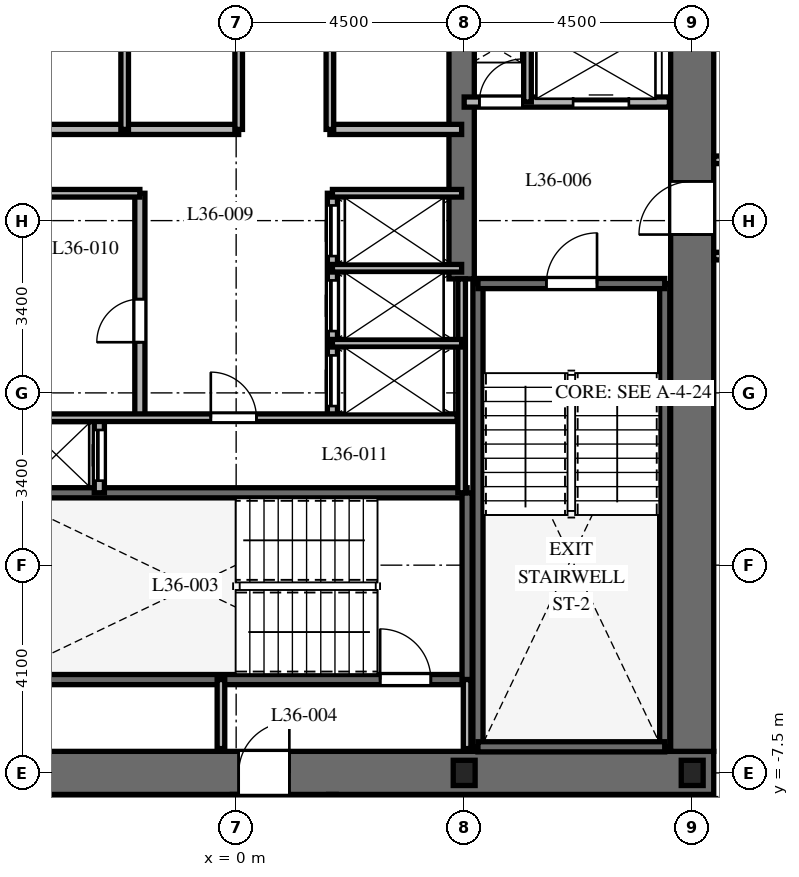
"""IFC4 building model, lengths in metres.
Left out: names, types, materials, properties, quantities, classifications, styles, units other than length and angle.
Written with IfcOpenShell. Run it as: python <this file> out.ifc"""

import sys

from ifc_helpers import new_model, si_unit, direction, frame, frame_2d, origin, origin_2d, place, context, subcontext, project, spatial, rectangle, i_section, extrude, element, fill, save


model = new_model("IFC4")
c1 = context("Model", 3, precision=1e-05, world=origin(), true_north=direction((0.0, 1.0)))
c2 = subcontext(c1, "Body", "Model", "MODEL_VIEW")
j1 = project(units=[si_unit("LENGTHUNIT", "METRE"), si_unit("PLANEANGLEUNIT", "RADIAN")], contexts=[c1])
p1 = place(None, origin())
s1 = spatial("IfcSite", under=j1, at=p1, CompositionType="ELEMENT")
p2 = place(p1, origin())
s2 = spatial("IfcBuilding", under=s1, at=p2, CompositionType="ELEMENT")
p3 = place(p2, frame((0.0, 0.0, 148.0)))
s3 = spatial("IfcBuildingStorey", under=s2, at=p3, CompositionType="ELEMENT", Elevation=148.0)
p4 = place(p3, frame((-9.425, -7.5, 0.0), z_axis=(0.0, 0.0, 1.0), x_axis=(1.0, 0.0, 0.0)))
e1 = element("IfcWall", 1, at=p4, inside=s3, PredefinedType="SHEAR", context=c2, shape_type="SweptSolid", body=[
    extrude(rectangle(XDim=18.85, YDim=0.85, at=frame_2d((9.425, 0.0))), origin(), (0.0, 0.0, 1.0), 3.7),
])
p5 = place(p4, frame((9.475, 0.0, 0.0)))
e2 = element("IfcOpeningElement", 2, at=p5, cuts=e1, PredefinedType="OPENING", context=c2, shape_type="SweptSolid", body=[
    extrude(rectangle(XDim=1.0, YDim=2.15, at=frame_2d((0.5, 1.075))), frame((0.0, 0.435, 0.0), z_axis=(0.0, -1.0, 0.0), x_axis=(1.0, 0.0, 0.0)), (0.0, 0.0, 1.0), 0.87),
])
p6 = place(p3, frame((9.0, -7.075, 0.0), z_axis=(0.0, 0.0, 1.0), x_axis=(0.0, 1.0, 0.0)))
e3 = element("IfcWall", 3, at=p6, inside=s3, PredefinedType="SHEAR", context=c2, shape_type="SweptSolid", body=[
    extrude(rectangle(XDim=14.15, YDim=0.85, at=frame_2d((7.075, 0.0))), origin(), (0.0, 0.0, 1.0), 3.7),
])
p7 = place(p6, frame((10.2, 0.0, 0.0)))
e4 = element("IfcOpeningElement", 4, at=p7, cuts=e3, PredefinedType="OPENING", context=c2, shape_type="SweptSolid", body=[
    extrude(rectangle(XDim=1.05, YDim=2.15, at=frame_2d((0.525, 1.075))), frame((0.0, 0.435, 0.0), z_axis=(0.0, -1.0, 0.0), x_axis=(1.0, 0.0, 0.0)), (0.0, 0.0, 1.0), 0.87),
])
p8 = place(p3, frame((4.45, 2.25, 0.0), z_axis=(0.0, 0.0, 1.0), x_axis=(0.0, 1.0, 0.0)))
e5 = element("IfcWall", 5, at=p8, inside=s3, PredefinedType="SHEAR", context=c2, shape_type="SweptSolid", body=[
    extrude(rectangle(XDim=4.825, YDim=0.5, at=frame_2d((2.413, 0.0))), origin(), (0.0, 0.0, 1.0), 3.7),
])
for number, where, z_axis, x_axis in (
    (6, (4.772, -6.985, 0.0), (0.0, 0.0, 1.0), (0.0, 1.0, 0.0)),
    (7, (8.458, -6.985, 0.0), (0.0, 0.0, 1.0), (0.0, 1.0, 0.0)),
):
    element("IfcWall", number, at=place(p3, frame(where, z_axis=z_axis, x_axis=x_axis)), inside=s3, PredefinedType="SHEAR", context=c2, shape_type="SweptSolid", body=[
        extrude(rectangle(XDim=9.143, YDim=0.2, at=frame_2d((4.572, 0.0))), origin(), (0.0, 0.0, 1.0), 3.7),
    ])
p9 = place(p3, frame((4.772, -6.985, 0.0), z_axis=(0.0, 0.0, 1.0), x_axis=(1.0, 0.0, 0.0)))
e8 = element("IfcWall", 8, at=p9, inside=s3, PredefinedType="SHEAR", context=c2, shape_type="SweptSolid", body=[
    extrude(rectangle(XDim=3.686, YDim=0.2, at=frame_2d((1.843, 0.0))), origin(), (0.0, 0.0, 1.0), 3.7),
])
p10 = place(p3, frame((4.772, 2.158, 0.0), z_axis=(0.0, 0.0, 1.0), x_axis=(1.0, 0.0, 0.0)))
e9 = element("IfcWall", 9, at=p10, inside=s3, PredefinedType="SHEAR", context=c2, shape_type="SweptSolid", body=[
    extrude(rectangle(XDim=3.686, YDim=0.2, at=frame_2d((1.843, 0.0))), origin(), (0.0, 0.0, 1.0), 3.7),
])
p11 = place(p10, frame((1.35, 0.0, 0.0)))
e10 = element("IfcOpeningElement", 10, at=p11, cuts=e9, PredefinedType="OPENING", context=c2, shape_type="SweptSolid", body=[
    extrude(rectangle(XDim=1.0, YDim=2.15, at=frame_2d((0.5, 1.075))), frame((0.0, 0.11, 0.0), z_axis=(0.0, -1.0, 0.0), x_axis=(1.0, 0.0, 0.0)), (0.0, 0.0, 1.0), 0.22),
])
p12 = place(p3, frame((-4.608, -5.658, 0.0), z_axis=(0.0, 0.0, 1.0), x_axis=(1.0, 0.0, 0.0)))
e11 = element("IfcWall", 11, at=p12, inside=s3, PredefinedType="SHEAR", context=c2, shape_type="SweptSolid", body=[
    extrude(rectangle(XDim=9.166, YDim=0.2, at=frame_2d((4.583, 0.0))), origin(), (0.0, 0.0, 1.0), 3.7),
])
p13 = place(p12, frame((7.45, 0.0, 0.0)))
e12 = element("IfcOpeningElement", 12, at=p13, cuts=e11, PredefinedType="OPENING", context=c2, shape_type="SweptSolid", body=[
    extrude(rectangle(XDim=1.0, YDim=2.15, at=frame_2d((0.5, 1.075))), frame((0.0, 0.11, 0.0), z_axis=(0.0, -1.0, 0.0), x_axis=(1.0, 0.0, 0.0)), (0.0, 0.0, 1.0), 0.22),
])
p14 = place(p3, frame((-4.608, -1.972, 0.0), z_axis=(0.0, 0.0, 1.0), x_axis=(1.0, 0.0, 0.0)))
e13 = element("IfcWall", 13, at=p14, inside=s3, PredefinedType="SHEAR", context=c2, shape_type="SweptSolid", body=[
    extrude(rectangle(XDim=9.166, YDim=0.2, at=frame_2d((4.583, 0.0))), origin(), (0.0, 0.0, 1.0), 3.7),
])
p15 = place(p3, frame((4.558, -5.658, 0.0), z_axis=(0.0, 0.0, 1.0), x_axis=(0.0, 1.0, 0.0)))
e14 = element("IfcWall", 14, at=p15, inside=s3, PredefinedType="SHEAR", context=c2, shape_type="SweptSolid", body=[
    extrude(rectangle(XDim=3.686, YDim=0.2, at=frame_2d((1.843, 0.0))), origin(), (0.0, 0.0, 1.0), 3.7),
])
for number, where, z_axis, x_axis in (
    (15, (4.5, -7.5, 0.0), (0.0, 0.0, 1.0), (1.0, 0.0, 0.0)),
    (16, (9.0, -7.5, 0.0), (0.0, 0.0, 1.0), (1.0, 0.0, 0.0)),
):
    element("IfcColumn", number, at=place(p3, frame(where, z_axis=z_axis, x_axis=x_axis)), inside=s3, PredefinedType="COLUMN", context=c2, shape_type="SweptSolid", body=[
        extrude(i_section(OverallWidth=0.432, OverallDepth=0.498, WebThickness=0.056, FlangeThickness=0.089, at=origin_2d()), origin(), (0.0, 0.0, 1.0), 3.7),
    ])
for number, where, z_axis, x_axis in (
    (17, (-0.3, -7.02, 0.0), (0.0, 0.0, 1.0), (0.0, 1.0, 0.0)),
    (18, (4.558, -7.02, 0.0), (0.0, 0.0, 1.0), (0.0, 1.0, 0.0)),
):
    element("IfcWall", number, at=place(p3, frame(where, z_axis=z_axis, x_axis=x_axis)), inside=s3, PredefinedType="PARTITIONING", context=c2, shape_type="SweptSolid", body=[
        extrude(rectangle(XDim=1.362, YDim=0.15, at=frame_2d((0.681, 0.0))), origin(), (0.0, 0.0, 1.0), 3.4),
    ])
p16 = place(p3, frame((4.5, 5.74, 0.0), z_axis=(0.0, 0.0, 1.0), x_axis=(1.0, 0.0, 0.0)))
e19 = element("IfcWall", 19, at=p16, inside=s3, PredefinedType="PARTITIONING", context=c2, shape_type="SweptSolid", body=[
    extrude(rectangle(XDim=4.05, YDim=0.2, at=frame_2d((2.025, 0.0))), origin(), (0.0, 0.0, 1.0), 3.4),
])
p17 = place(p16, frame((0.3, 0.0, 0.0)))
e20 = element("IfcOpeningElement", 20, at=p17, cuts=e19, PredefinedType="OPENING", context=c2, shape_type="SweptSolid", body=[
    extrude(rectangle(XDim=0.85, YDim=2.03, at=frame_2d((0.425, 1.015))), frame((0.0, 0.11, 0.0), z_axis=(0.0, -1.0, 0.0), x_axis=(1.0, 0.0, 0.0)), (0.0, 0.0, 1.0), 0.22),
])
p18 = place(p16, frame((2.15, 0.0, 0.0)))
e21 = element("IfcOpeningElement", 21, at=p18, cuts=e19, PredefinedType="OPENING", context=c2, shape_type="SweptSolid", body=[
    extrude(rectangle(XDim=1.1, YDim=2.2, at=frame_2d((0.55, 1.1))), frame((0.0, 0.11, 0.0), z_axis=(0.0, -1.0, 0.0), x_axis=(1.0, 0.0, 0.0)), (0.0, 0.0, 1.0), 0.22),
])
p19 = place(p3, frame((5.75, 5.74, 0.0), z_axis=(0.0, 0.0, 1.0), x_axis=(0.0, 1.0, 0.0)))
e22 = element("IfcWall", 22, at=p19, inside=s3, PredefinedType="PARTITIONING", context=c2, shape_type="SweptSolid", body=[
    extrude(rectangle(XDim=1.41, YDim=0.15, at=frame_2d((0.705, 0.0))), origin(), (0.0, 0.0, 1.0), 3.4),
])
p20 = place(p3, frame((-2.7, -1.972, 0.0), z_axis=(0.0, 0.0, 1.0), x_axis=(0.0, 1.0, 0.0)))
e23 = element("IfcWall", 23, at=p20, inside=s3, PredefinedType="PARTITIONING", context=c2, shape_type="SweptSolid", body=[
    extrude(rectangle(XDim=1.472, YDim=0.2, at=frame_2d((0.736, 0.0))), origin(), (0.0, 0.0, 1.0), 3.4),
])
p21 = place(p20, frame((0.24, 0.0, 0.0)))
e24 = element("IfcOpeningElement", 24, at=p21, cuts=e23, PredefinedType="OPENING", context=c2, shape_type="SweptSolid", body=[
    extrude(rectangle(XDim=1.0, YDim=2.2, at=frame_2d((0.5, 1.1))), frame((0.0, 0.11, 0.0), z_axis=(0.0, -1.0, 0.0), x_axis=(1.0, 0.0, 0.0)), (0.0, 0.0, 1.0), 0.22),
])
p22 = place(p3, frame((-4.45, 5.2, 0.0), z_axis=(0.0, 0.0, 1.0), x_axis=(1.0, 0.0, 0.0)))
e25 = element("IfcWall", 25, at=p22, inside=s3, PredefinedType="PARTITIONING", context=c2, shape_type="SweptSolid", body=[
    extrude(rectangle(XDim=4.5, YDim=0.2, at=frame_2d((2.25, 0.0))), origin(), (0.0, 0.0, 1.0), 3.4),
])
p23 = place(p3, frame((1.85, 5.2, 0.0), z_axis=(0.0, 0.0, 1.0), x_axis=(1.0, 0.0, 0.0)))
e26 = element("IfcWall", 26, at=p23, inside=s3, PredefinedType="PARTITIONING", context=c2, shape_type="SweptSolid", body=[
    extrude(rectangle(XDim=2.6, YDim=0.2, at=frame_2d((1.3, 0.0))), origin(), (0.0, 0.0, 1.0), 3.4),
])
p24 = place(p3, frame((-2.2, 5.2, 0.0), z_axis=(0.0, 0.0, 1.0), x_axis=(0.0, 1.0, 0.0)))
e27 = element("IfcWall", 27, at=p24, inside=s3, PredefinedType="PARTITIONING", context=c2, shape_type="SweptSolid", body=[
    extrude(rectangle(XDim=1.85, YDim=0.15, at=frame_2d((0.925, 0.0))), origin(), (0.0, 0.0, 1.0), 3.4),
])
for number, where, z_axis, x_axis in (
    (28, (0.05, 5.2, 0.0), (0.0, 0.0, 1.0), (0.0, 1.0, 0.0)),
    (29, (1.85, 5.2, 0.0), (0.0, 0.0, 1.0), (0.0, 1.0, 0.0)),
):
    element("IfcWall", number, at=place(p3, frame(where, z_axis=z_axis, x_axis=x_axis)), inside=s3, PredefinedType="PARTITIONING", context=c2, shape_type="SweptSolid", body=[
        extrude(rectangle(XDim=1.95, YDim=0.15, at=frame_2d((0.975, 0.0))), origin(), (0.0, 0.0, 1.0), 3.4),
    ])
p25 = place(p3, frame((4.45, -1.972, 0.0), z_axis=(0.0, 0.0, 1.0), x_axis=(0.0, 1.0, 0.0)))
e30 = element("IfcWall", 30, at=p25, inside=s3, PredefinedType="PARTITIONING", context=c2, shape_type="SweptSolid", body=[
    extrude(rectangle(XDim=4.222, YDim=0.15, at=frame_2d((2.111, 0.0))), origin(), (0.0, 0.0, 1.0), 3.4),
])
p26 = place(p3, frame((-1.9, -0.5, 0.0), z_axis=(0.0, 0.0, 1.0), x_axis=(0.0, 1.0, 0.0)))
e31 = element("IfcWall", 31, at=p26, inside=s3, PredefinedType="PARTITIONING", context=c2, shape_type="SweptSolid", body=[
    extrude(rectangle(XDim=4.44, YDim=0.2, at=frame_2d((2.22, 0.0))), origin(), (0.0, 0.0, 1.0), 3.4),
])
p27 = place(p26, frame((1.5, 0.0, 0.0)))
e32 = element("IfcOpeningElement", 32, at=p27, cuts=e31, PredefinedType="OPENING", context=c2, shape_type="SweptSolid", body=[
    extrude(rectangle(XDim=0.85, YDim=2.03, at=frame_2d((0.425, 1.015))), frame((0.0, 0.11, 0.0), z_axis=(0.0, -1.0, 0.0), x_axis=(1.0, 0.0, 0.0)), (0.0, 0.0, 1.0), 0.22),
])
p28 = place(p3, frame((-4.45, 3.94, 0.0), z_axis=(0.0, 0.0, 1.0), x_axis=(1.0, 0.0, 0.0)))
e33 = element("IfcWall", 33, at=p28, inside=s3, PredefinedType="PARTITIONING", context=c2, shape_type="SweptSolid", body=[
    extrude(rectangle(XDim=2.55, YDim=0.15, at=frame_2d((1.275, 0.0))), origin(), (0.0, 0.0, 1.0), 3.4),
])
p29 = place(p3, frame((1.9, -0.5, 0.0), z_axis=(0.0, 0.0, 1.0), x_axis=(0.0, 1.0, 0.0)))
e34 = element("IfcWall", 34, at=p29, inside=s3, PredefinedType="PARTITIONING", context=c2, shape_type="SweptSolid", body=[
    extrude(rectangle(XDim=4.44, YDim=0.2, at=frame_2d((2.22, 0.0))), origin(), (0.0, 0.0, 1.0), 3.4),
])
p30 = place(p29, frame((0.24, 0.0, 0.0)))
e35 = element("IfcOpeningElement", 35, at=p30, cuts=e34, PredefinedType="OPENING", context=c2, shape_type="SweptSolid", body=[
    extrude(rectangle(XDim=1.0, YDim=2.2, at=frame_2d((0.5, 1.1))), frame((0.0, 0.11, 0.0), z_axis=(0.0, -1.0, 0.0), x_axis=(1.0, 0.0, 0.0)), (0.0, 0.0, 1.0), 0.22),
])
p31 = place(p29, frame((1.72, 0.0, 0.0)))
e36 = element("IfcOpeningElement", 36, at=p31, cuts=e34, PredefinedType="OPENING", context=c2, shape_type="SweptSolid", body=[
    extrude(rectangle(XDim=1.0, YDim=2.2, at=frame_2d((0.5, 1.1))), frame((0.0, 0.11, 0.0), z_axis=(0.0, -1.0, 0.0), x_axis=(1.0, 0.0, 0.0)), (0.0, 0.0, 1.0), 0.22),
])
p32 = place(p29, frame((3.2, 0.0, 0.0)))
e37 = element("IfcOpeningElement", 37, at=p32, cuts=e34, PredefinedType="OPENING", context=c2, shape_type="SweptSolid", body=[
    extrude(rectangle(XDim=1.0, YDim=2.2, at=frame_2d((0.5, 1.1))), frame((0.0, 0.11, 0.0), z_axis=(0.0, -1.0, 0.0), x_axis=(1.0, 0.0, 0.0)), (0.0, 0.0, 1.0), 0.22),
])
for number, where, z_axis, x_axis in (
    (38, (1.9, 3.94, 0.0), (0.0, 0.0, 1.0), (1.0, 0.0, 0.0)),
    (39, (1.9, 0.98, 0.0), (0.0, 0.0, 1.0), (1.0, 0.0, 0.0)),
    (40, (1.9, 2.46, 0.0), (0.0, 0.0, 1.0), (1.0, 0.0, 0.0)),
):
    element("IfcWall", number, at=place(p3, frame(where, z_axis=z_axis, x_axis=x_axis)), inside=s3, PredefinedType="PARTITIONING", context=c2, shape_type="SweptSolid", body=[
        extrude(rectangle(XDim=2.55, YDim=0.15, at=frame_2d((1.275, 0.0))), origin(), (0.0, 0.0, 1.0), 3.4),
    ])
p33 = place(p3, frame((-4.36, -0.49, 0.0), z_axis=(0.0, 0.0, 1.0), x_axis=(1.0, 0.0, 0.0)))
e41 = element("IfcWall", 41, at=p33, inside=s3, PredefinedType="PARTITIONING", context=c2, shape_type="SweptSolid", body=[
    extrude(rectangle(XDim=8.72, YDim=0.15, at=frame_2d((4.36, 0.0))), origin(), (0.0, 0.0, 1.0), 3.4),
])
p34 = place(p33, frame((3.86, 0.0, 0.0)))
e42 = element("IfcOpeningElement", 42, at=p34, cuts=e41, PredefinedType="OPENING", context=c2, shape_type="SweptSolid", body=[
    extrude(rectangle(XDim=0.9, YDim=2.03, at=frame_2d((0.45, 1.015))), frame((0.0, 0.085, 0.0), z_axis=(0.0, -1.0, 0.0), x_axis=(1.0, 0.0, 0.0)), (0.0, 0.0, 1.0), 0.17),
])
p35 = place(p3, frame((11.55, 2.7, 0.0), z_axis=(0.0, 0.0, 1.0), x_axis=(-1.0, 0.0, 0.0)))
e43 = element("IfcWall", 43, at=p35, inside=s3, PredefinedType="PARTITIONING", context=c2, shape_type="SweptSolid", body=[
    extrude(rectangle(XDim=2.125, YDim=0.15, at=frame_2d((1.062, 0.0))), origin(), (0.0, 0.0, 1.0), 3.4),
])
p36 = place(p3, frame((9.425, 4.6, 0.0), z_axis=(0.0, 0.0, 1.0), x_axis=(1.0, 0.0, 0.0)))
e44 = element("IfcWall", 44, at=p36, inside=s3, PredefinedType="PARTITIONING", context=c2, shape_type="SweptSolid", body=[
    extrude(rectangle(XDim=2.125, YDim=0.15, at=frame_2d((1.062, 0.0))), origin(), (0.0, 0.0, 1.0), 3.4),
])
p37 = place(p36, frame((0.637, 0.0, 0.0)))
e45 = element("IfcOpeningElement", 45, at=p37, cuts=e44, PredefinedType="OPENING", context=c2, shape_type="SweptSolid", body=[
    extrude(rectangle(XDim=0.85, YDim=2.03, at=frame_2d((0.425, 1.015))), frame((0.0, 0.085, 0.0), z_axis=(0.0, -1.0, 0.0), x_axis=(1.0, 0.0, 0.0)), (0.0, 0.0, 1.0), 0.17),
])
for number, where, z_axis, x_axis in (
    (46, (0.0, -10.05, 0.0), (0.0, 0.0, 1.0), (0.0, 1.0, 0.0)),
    (47, (1.9, -7.925, 0.0), (0.0, 0.0, 1.0), (0.0, -1.0, 0.0)),
):
    element("IfcWall", number, at=place(p3, frame(where, z_axis=z_axis, x_axis=x_axis)), inside=s3, PredefinedType="PARTITIONING", context=c2, shape_type="SweptSolid", body=[
        extrude(rectangle(XDim=2.125, YDim=0.15, at=frame_2d((1.062, 0.0))), origin(), (0.0, 0.0, 1.0), 3.4),
    ])
p38 = place(p11, origin())
e48 = element("IfcDoor", 48, at=p38, inside=s3, OperationType="SINGLE_SWING_RIGHT", PredefinedType="DOOR", context=c2, shape_type="SweptSolid", body=[
    extrude(rectangle(XDim=1.0, YDim=2.15, at=frame_2d((0.5, 1.075))), frame((0.0, 0.025, 0.0), z_axis=(0.0, -1.0, 0.0), x_axis=(1.0, 0.0, 0.0)), (0.0, 0.0, 1.0), 0.05),
])
fill(e10, e48)
p39 = place(p13, origin())
e49 = element("IfcDoor", 49, at=p39, inside=s3, OperationType="SINGLE_SWING_LEFT", PredefinedType="DOOR", context=c2, shape_type="SweptSolid", body=[
    extrude(rectangle(XDim=1.0, YDim=2.15, at=frame_2d((0.5, 1.075))), frame((0.0, 0.025, 0.0), z_axis=(0.0, -1.0, 0.0), x_axis=(1.0, 0.0, 0.0)), (0.0, 0.0, 1.0), 0.05),
])
fill(e12, e49)
p40 = place(p5, origin())
e50 = element("IfcDoor", 50, at=p40, inside=s3, OperationType="SINGLE_SWING_RIGHT", PredefinedType="DOOR", context=c2, shape_type="SweptSolid", body=[
    extrude(rectangle(XDim=1.0, YDim=2.15, at=frame_2d((0.5, 1.075))), frame((0.0, 0.025, 0.0), z_axis=(0.0, -1.0, 0.0), x_axis=(1.0, 0.0, 0.0)), (0.0, 0.0, 1.0), 0.05),
])
fill(e2, e50)
p41 = place(p7, origin())
e51 = element("IfcDoor", 51, at=p41, inside=s3, OperationType="SINGLE_SWING_LEFT", PredefinedType="DOOR", context=c2, shape_type="SweptSolid", body=[
    extrude(rectangle(XDim=1.05, YDim=2.15, at=frame_2d((0.525, 1.075))), frame((0.0, 0.025, 0.0), z_axis=(0.0, -1.0, 0.0), x_axis=(1.0, 0.0, 0.0)), (0.0, 0.0, 1.0), 0.05),
])
fill(e4, e51)
p42 = place(p17, origin())
e52 = element("IfcDoor", 52, at=p42, inside=s3, OperationType="SINGLE_SWING_RIGHT", PredefinedType="DOOR", context=c2, shape_type="SweptSolid", body=[
    extrude(rectangle(XDim=0.85, YDim=2.03, at=frame_2d((0.425, 1.015))), frame((0.0, 0.025, 0.0), z_axis=(0.0, -1.0, 0.0), x_axis=(1.0, 0.0, 0.0)), (0.0, 0.0, 1.0), 0.05),
])
fill(e20, e52)
p43 = place(p18, origin())
e53 = element("IfcDoor", 53, at=p43, inside=s3, OperationType="SLIDING_TO_RIGHT", PredefinedType="DOOR", context=c2, shape_type="SweptSolid", body=[
    extrude(rectangle(XDim=1.1, YDim=2.2, at=frame_2d((0.55, 1.1))), frame((0.0, 0.025, 0.0), z_axis=(0.0, -1.0, 0.0), x_axis=(1.0, 0.0, 0.0)), (0.0, 0.0, 1.0), 0.05),
])
fill(e21, e53)
p44 = place(p21, origin())
e54 = element("IfcDoor", 54, at=p44, inside=s3, OperationType="SLIDING_TO_LEFT", PredefinedType="DOOR", context=c2, shape_type="SweptSolid", body=[
    extrude(rectangle(XDim=1.0, YDim=2.2, at=frame_2d((0.5, 1.1))), frame((0.0, 0.025, 0.0), z_axis=(0.0, -1.0, 0.0), x_axis=(1.0, 0.0, 0.0)), (0.0, 0.0, 1.0), 0.05),
])
fill(e24, e54)
p45 = place(p27, origin())
e55 = element("IfcDoor", 55, at=p45, inside=s3, OperationType="SINGLE_SWING_LEFT", PredefinedType="DOOR", context=c2, shape_type="SweptSolid", body=[
    extrude(rectangle(XDim=0.85, YDim=2.03, at=frame_2d((0.425, 1.015))), frame((0.0, 0.025, 0.0), z_axis=(0.0, -1.0, 0.0), x_axis=(1.0, 0.0, 0.0)), (0.0, 0.0, 1.0), 0.05),
])
fill(e32, e55)
p46 = place(p30, origin())
e56 = element("IfcDoor", 56, at=p46, inside=s3, OperationType="SLIDING_TO_RIGHT", PredefinedType="DOOR", context=c2, shape_type="SweptSolid", body=[
    extrude(rectangle(XDim=1.0, YDim=2.2, at=frame_2d((0.5, 1.1))), frame((0.0, 0.025, 0.0), z_axis=(0.0, -1.0, 0.0), x_axis=(1.0, 0.0, 0.0)), (0.0, 0.0, 1.0), 0.05),
])
fill(e35, e56)
p47 = place(p31, origin())
e57 = element("IfcDoor", 57, at=p47, inside=s3, OperationType="SLIDING_TO_RIGHT", PredefinedType="DOOR", context=c2, shape_type="SweptSolid", body=[
    extrude(rectangle(XDim=1.0, YDim=2.2, at=frame_2d((0.5, 1.1))), frame((0.0, 0.025, 0.0), z_axis=(0.0, -1.0, 0.0), x_axis=(1.0, 0.0, 0.0)), (0.0, 0.0, 1.0), 0.05),
])
fill(e36, e57)
p48 = place(p32, origin())
e58 = element("IfcDoor", 58, at=p48, inside=s3, OperationType="SLIDING_TO_RIGHT", PredefinedType="DOOR", context=c2, shape_type="SweptSolid", body=[
    extrude(rectangle(XDim=1.0, YDim=2.2, at=frame_2d((0.5, 1.1))), frame((0.0, 0.025, 0.0), z_axis=(0.0, -1.0, 0.0), x_axis=(1.0, 0.0, 0.0)), (0.0, 0.0, 1.0), 0.05),
])
fill(e37, e58)
p49 = place(p34, origin())
e59 = element("IfcDoor", 59, at=p49, inside=s3, OperationType="SINGLE_SWING_LEFT", PredefinedType="DOOR", context=c2, shape_type="SweptSolid", body=[
    extrude(rectangle(XDim=0.9, YDim=2.03, at=frame_2d((0.45, 1.015))), frame((0.0, 0.025, 0.0), z_axis=(0.0, -1.0, 0.0), x_axis=(1.0, 0.0, 0.0)), (0.0, 0.0, 1.0), 0.05),
])
fill(e42, e59)
save(model, sys.argv[1])
